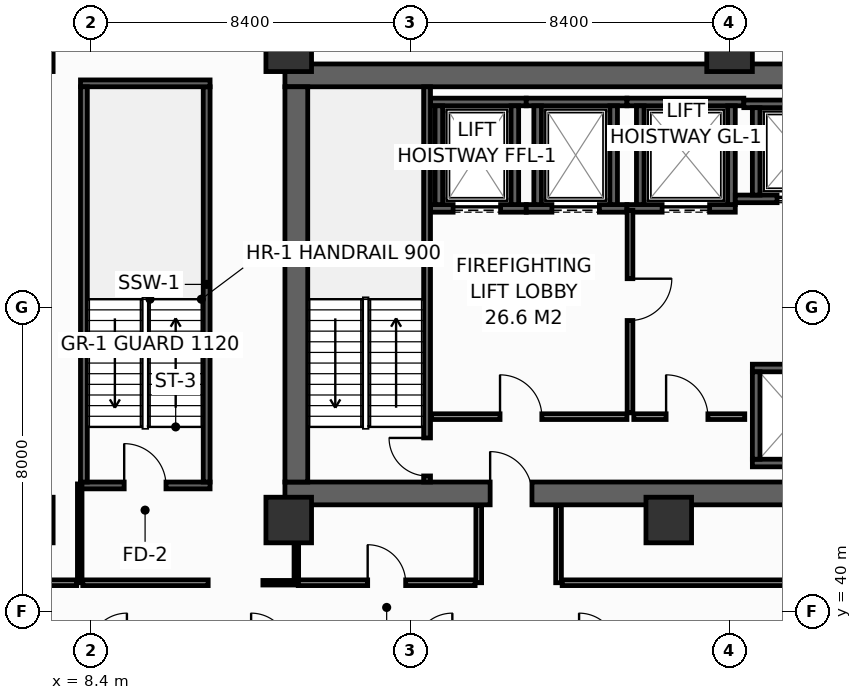
"""IFC4 building model, lengths in metres.
Left out: names, types, materials, properties, quantities, classifications, styles, units other than length and angle.
Written with IfcOpenShell. Run it as: python <this file> out.ifc"""

import sys

from ifc_helpers import new_model, si_unit, direction, frame, frame_2d, origin, origin_2d, place, context, subcontext, project, spatial, rectangle, hollow_rectangle, extrude, element, fill, save


model = new_model("IFC4")
c1 = context("Model", 3, precision=1e-05, world=origin(), true_north=direction((0.0, 1.0)))
c2 = subcontext(c1, "Body", "Model", "MODEL_VIEW")
j1 = project(units=[si_unit("LENGTHUNIT", "METRE"), si_unit("PLANEANGLEUNIT", "RADIAN")], contexts=[c1])
p1 = place(None, origin())
s1 = spatial("IfcSite", under=j1, at=p1, CompositionType="ELEMENT")
p2 = place(p1, origin())
s2 = spatial("IfcBuilding", under=s1, at=p2, CompositionType="ELEMENT")
p3 = place(p2, frame((0.0, 0.0, 82.4)))
s3 = spatial("IfcBuildingStorey", under=s2, at=p3, CompositionType="ELEMENT", Elevation=82.4)
p4 = place(p3, frame((13.5, 43.1, 0.0), z_axis=(0.0, 0.0, 1.0), x_axis=(1.0, 0.0, 0.0)))
e1 = element("IfcWall", 1, at=p4, inside=s3, PredefinedType="SHEAR", context=c2, shape_type="SweptSolid", body=[
    extrude(rectangle(XDim=32.9, YDim=0.6, at=frame_2d((16.45, 0.0))), origin(), (0.0, 0.0, 1.0), 3.95),
])
p5 = place(p4, frame((5.4, 0.0, 0.0)))
e2 = element("IfcOpeningElement", 2, at=p5, cuts=e1, PredefinedType="OPENING", context=c2, shape_type="SweptSolid", body=[
    extrude(rectangle(XDim=1.1, YDim=2.15, at=frame_2d((0.55, 1.075))), frame((0.0, 0.31, 0.0), z_axis=(0.0, -1.0, 0.0), x_axis=(1.0, 0.0, 0.0)), (0.0, 0.0, 1.0), 0.62),
])
p6 = place(p4, frame((25.6, 0.0, 0.0)))
e3 = element("IfcOpeningElement", 3, at=p6, cuts=e1, PredefinedType="OPENING", context=c2, shape_type="SweptSolid", body=[
    extrude(rectangle(XDim=1.1, YDim=2.15, at=frame_2d((0.55, 1.075))), frame((0.0, 0.31, 0.0), z_axis=(0.0, -1.0, 0.0), x_axis=(1.0, 0.0, 0.0)), (0.0, 0.0, 1.0), 0.62),
])
p7 = place(p3, frame((13.5, 54.1, 0.0), z_axis=(0.0, 0.0, 1.0), x_axis=(1.0, 0.0, 0.0)))
e4 = element("IfcWall", 4, at=p7, inside=s3, PredefinedType="SHEAR", context=c2, shape_type="SweptSolid", body=[
    extrude(rectangle(XDim=32.9, YDim=0.6, at=frame_2d((16.45, 0.0))), origin(), (0.0, 0.0, 1.0), 3.95),
])
p8 = place(p3, frame((13.8, 43.4, 0.0), z_axis=(0.0, 0.0, 1.0), x_axis=(0.0, 1.0, 0.0)))
e5 = element("IfcWall", 5, at=p8, inside=s3, PredefinedType="SHEAR", context=c2, shape_type="SweptSolid", body=[
    extrude(rectangle(XDim=10.4, YDim=0.6, at=frame_2d((5.2, 0.0))), origin(), (0.0, 0.0, 1.0), 3.95),
])
for number, where, z_axis, x_axis in (
    (6, (6.8, 54.8, 0.0), (0.0, 0.0, 1.0), (1.0, 0.0, 0.0)),
    (7, (13.6, 54.8, 0.0), (0.0, 0.0, 1.0), (1.0, 0.0, 0.0)),
    (8, (25.2, 54.8, 0.0), (0.0, 0.0, 1.0), (1.0, 0.0, 0.0)),
    (9, (6.8, 42.4, 0.0), (0.0, 0.0, 1.0), (1.0, 0.0, 0.0)),
    (10, (13.6, 42.4, 0.0), (0.0, 0.0, 1.0), (1.0, 0.0, 0.0)),
    (11, (23.6, 42.4, 0.0), (0.0, 0.0, 1.0), (1.0, 0.0, 0.0)),
):
    element("IfcColumn", number, at=place(p3, frame(where, z_axis=z_axis, x_axis=x_axis)), inside=s3, PredefinedType="COLUMN", context=c2, shape_type="SweptSolid", body=[
        extrude(hollow_rectangle(XDim=1.2, YDim=1.2, WallThickness=0.055, at=origin_2d()), origin(), (0.0, 0.0, 1.0), 4.4),
    ])
p9 = place(p3, frame((17.33, 50.6, 0.0), z_axis=(0.0, 0.0, 1.0), x_axis=(1.0, 0.0, 0.0)))
e12 = element("IfcWall", 12, at=p9, inside=s3, PredefinedType="SHEAR", context=c2, shape_type="SweptSolid", body=[
    extrude(rectangle(XDim=2.52, YDim=0.2, at=frame_2d((1.26, 0.0))), origin(), (0.0, 0.0, 1.0), 3.95),
])
p10 = place(p9, frame((0.595, 0.0, 0.0)))
e13 = element("IfcOpeningElement", 13, at=p10, cuts=e12, PredefinedType="OPENING", context=c2, shape_type="SweptSolid", body=[
    extrude(rectangle(XDim=1.25, YDim=2.3, at=frame_2d((0.625, 1.15))), frame((0.0, 0.11, 0.0), z_axis=(0.0, -1.0, 0.0), x_axis=(1.0, 0.0, 0.0)), (0.0, 0.0, 1.0), 0.22),
])
p11 = place(p3, frame((17.33, 53.4, 0.0), z_axis=(0.0, 0.0, 1.0), x_axis=(1.0, 0.0, 0.0)))
e14 = element("IfcWall", 14, at=p11, inside=s3, PredefinedType="SHEAR", context=c2, shape_type="SweptSolid", body=[
    extrude(rectangle(XDim=2.52, YDim=0.2, at=frame_2d((1.26, 0.0))), origin(), (0.0, 0.0, 1.0), 3.95),
])
for number, where, z_axis, x_axis in (
    (15, (17.55, 50.7, 0.0), (0.0, 0.0, 1.0), (0.0, 1.0, 0.0)),
    (16, (19.55, 50.7, 0.0), (0.0, 0.0, 1.0), (0.0, 1.0, 0.0)),
):
    element("IfcWall", number, at=place(p3, frame(where, z_axis=z_axis, x_axis=x_axis)), inside=s3, PredefinedType="SHEAR", context=c2, shape_type="SweptSolid", body=[
        extrude(rectangle(XDim=2.6, YDim=0.2, at=frame_2d((1.3, 0.0))), origin(), (0.0, 0.0, 1.0), 3.95),
    ])
p12 = place(p3, frame((19.85, 50.6, 0.0), z_axis=(0.0, 0.0, 1.0), x_axis=(1.0, 0.0, 0.0)))
e17 = element("IfcWall", 17, at=p12, inside=s3, PredefinedType="SHEAR", context=c2, shape_type="SweptSolid", body=[
    extrude(rectangle(XDim=2.65, YDim=0.2, at=frame_2d((1.325, 0.0))), origin(), (0.0, 0.0, 1.0), 3.95),
])
p13 = place(p12, frame((0.675, 0.0, 0.0)))
e18 = element("IfcOpeningElement", 18, at=p13, cuts=e17, PredefinedType="OPENING", context=c2, shape_type="SweptSolid", body=[
    extrude(rectangle(XDim=1.25, YDim=2.3, at=frame_2d((0.625, 1.15))), frame((0.0, 0.11, 0.0), z_axis=(0.0, -1.0, 0.0), x_axis=(1.0, 0.0, 0.0)), (0.0, 0.0, 1.0), 0.22),
])
p14 = place(p3, frame((19.85, 53.4, 0.0), z_axis=(0.0, 0.0, 1.0), x_axis=(1.0, 0.0, 0.0)))
e19 = element("IfcWall", 19, at=p14, inside=s3, PredefinedType="SHEAR", context=c2, shape_type="SweptSolid", body=[
    extrude(rectangle(XDim=2.65, YDim=0.2, at=frame_2d((1.325, 0.0))), origin(), (0.0, 0.0, 1.0), 3.95),
])
for number, where, z_axis, x_axis in (
    (20, (20.15, 50.7, 0.0), (0.0, 0.0, 1.0), (0.0, 1.0, 0.0)),
    (21, (22.15, 50.7, 0.0), (0.0, 0.0, 1.0), (0.0, 1.0, 0.0)),
):
    element("IfcWall", number, at=place(p3, frame(where, z_axis=z_axis, x_axis=x_axis)), inside=s3, PredefinedType="SHEAR", context=c2, shape_type="SweptSolid", body=[
        extrude(rectangle(XDim=2.6, YDim=0.2, at=frame_2d((1.3, 0.0))), origin(), (0.0, 0.0, 1.0), 3.95),
    ])
p15 = place(p3, frame((22.5, 50.6, 0.0), z_axis=(0.0, 0.0, 1.0), x_axis=(1.0, 0.0, 0.0)))
e22 = element("IfcWall", 22, at=p15, inside=s3, PredefinedType="SHEAR", context=c2, shape_type="SweptSolid", body=[
    extrude(rectangle(XDim=2.85, YDim=0.2, at=frame_2d((1.425, 0.0))), origin(), (0.0, 0.0, 1.0), 3.95),
])
p16 = place(p15, frame((0.925, 0.0, 0.0)))
e23 = element("IfcOpeningElement", 23, at=p16, cuts=e22, PredefinedType="OPENING", context=c2, shape_type="SweptSolid", body=[
    extrude(rectangle(XDim=1.25, YDim=2.3, at=frame_2d((0.625, 1.15))), frame((0.0, 0.11, 0.0), z_axis=(0.0, -1.0, 0.0), x_axis=(1.0, 0.0, 0.0)), (0.0, 0.0, 1.0), 0.22),
])
p17 = place(p3, frame((22.5, 53.4, 0.0), z_axis=(0.0, 0.0, 1.0), x_axis=(1.0, 0.0, 0.0)))
e24 = element("IfcWall", 24, at=p17, inside=s3, PredefinedType="SHEAR", context=c2, shape_type="SweptSolid", body=[
    extrude(rectangle(XDim=3.075, YDim=0.2, at=frame_2d((1.538, 0.0))), origin(), (0.0, 0.0, 1.0), 3.95),
])
for number, where, z_axis, x_axis in (
    (25, (22.85, 50.7, 0.0), (0.0, 0.0, 1.0), (0.0, 1.0, 0.0)),
    (26, (25.25, 50.7, 0.0), (0.0, 0.0, 1.0), (0.0, 1.0, 0.0)),
):
    element("IfcWall", number, at=place(p3, frame(where, z_axis=z_axis, x_axis=x_axis)), inside=s3, PredefinedType="SHEAR", context=c2, shape_type="SweptSolid", body=[
        extrude(rectangle(XDim=2.6, YDim=0.2, at=frame_2d((1.3, 0.0))), origin(), (0.0, 0.0, 1.0), 3.95),
    ])
p18 = place(p3, frame((25.35, 50.85, 0.0), z_axis=(0.0, 0.0, 1.0), x_axis=(1.0, 0.0, 0.0)))
e27 = element("IfcWall", 27, at=p18, inside=s3, PredefinedType="SHEAR", context=c2, shape_type="SweptSolid", body=[
    extrude(rectangle(XDim=3.025, YDim=0.2, at=frame_2d((1.512, 0.0))), origin(), (0.0, 0.0, 1.0), 3.95),
])
p19 = place(p18, frame((1.1, 0.0, 0.0)))
e28 = element("IfcOpeningElement", 28, at=p19, cuts=e27, PredefinedType="OPENING", context=c2, shape_type="SweptSolid", body=[
    extrude(rectangle(XDim=1.1, YDim=2.2, at=frame_2d((0.55, 1.1))), frame((0.0, 0.11, 0.0), z_axis=(0.0, -1.0, 0.0), x_axis=(1.0, 0.0, 0.0)), (0.0, 0.0, 1.0), 0.22),
])
p20 = place(p3, frame((25.575, 53.35, 0.0), z_axis=(0.0, 0.0, 1.0), x_axis=(1.0, 0.0, 0.0)))
e29 = element("IfcWall", 29, at=p20, inside=s3, PredefinedType="SHEAR", context=c2, shape_type="SweptSolid", body=[
    extrude(rectangle(XDim=2.8, YDim=0.2, at=frame_2d((1.4, 0.0))), origin(), (0.0, 0.0, 1.0), 3.95),
])
p21 = place(p3, frame((25.9, 50.95, 0.0), z_axis=(0.0, 0.0, 1.0), x_axis=(0.0, 1.0, 0.0)))
e30 = element("IfcWall", 30, at=p21, inside=s3, PredefinedType="SHEAR", context=c2, shape_type="SweptSolid", body=[
    extrude(rectangle(XDim=2.3, YDim=0.2, at=frame_2d((1.15, 0.0))), origin(), (0.0, 0.0, 1.0), 3.95),
])
for number, where, z_axis, x_axis in (
    (31, (25.8, 43.9, 0.0), (0.0, 0.0, 1.0), (1.0, 0.0, 0.0)),
    (32, (25.8, 46.4, 0.0), (0.0, 0.0, 1.0), (1.0, 0.0, 0.0)),
):
    element("IfcWall", number, at=place(p3, frame(where, z_axis=z_axis, x_axis=x_axis)), inside=s3, PredefinedType="SHEAR", context=c2, shape_type="SweptSolid", body=[
        extrude(rectangle(XDim=2.575, YDim=0.2, at=frame_2d((1.288, 0.0))), origin(), (0.0, 0.0, 1.0), 3.95),
    ])
p22 = place(p3, frame((25.9, 44.0, 0.0), z_axis=(0.0, 0.0, 1.0), x_axis=(0.0, 1.0, 0.0)))
e33 = element("IfcWall", 33, at=p22, inside=s3, PredefinedType="SHEAR", context=c2, shape_type="SweptSolid", body=[
    extrude(rectangle(XDim=2.3, YDim=0.2, at=frame_2d((1.15, 0.0))), origin(), (0.0, 0.0, 1.0), 3.95),
])
p23 = place(p3, frame((17.24, 43.4, 0.0), z_axis=(0.0, 0.0, 1.0), x_axis=(0.0, 1.0, 0.0)))
e34 = element("IfcWall", 34, at=p23, inside=s3, PredefinedType="SHEAR", context=c2, shape_type="SweptSolid", body=[
    extrude(rectangle(XDim=10.4, YDim=0.18, at=frame_2d((5.2, 0.0))), origin(), (0.0, 0.0, 1.0), 3.95),
])
p24 = place(p23, frame((0.16, 0.0, 0.0)))
e35 = element("IfcOpeningElement", 35, at=p24, cuts=e34, PredefinedType="OPENING", context=c2, shape_type="SweptSolid", body=[
    extrude(rectangle(XDim=1.0, YDim=2.15, at=frame_2d((0.5, 1.075))), frame((0.0, 0.1, 0.0), z_axis=(0.0, -1.0, 0.0), x_axis=(1.0, 0.0, 0.0)), (0.0, 0.0, 1.0), 0.2),
])
p25 = place(p3, frame((8.12, 43.31, 0.0), z_axis=(0.0, 0.0, 1.0), x_axis=(1.0, 0.0, 0.0)))
e36 = element("IfcWall", 36, at=p25, inside=s3, PredefinedType="SHEAR", context=c2, shape_type="SweptSolid", body=[
    extrude(rectangle(XDim=3.41, YDim=0.18, at=frame_2d((1.705, 0.0))), origin(), (0.0, 0.0, 1.0), 3.95),
])
p26 = place(p25, frame((1.15, 0.0, 0.0)))
e37 = element("IfcOpeningElement", 37, at=p26, cuts=e36, PredefinedType="OPENING", context=c2, shape_type="SweptSolid", body=[
    extrude(rectangle(XDim=1.1, YDim=2.15, at=frame_2d((0.55, 1.075))), frame((0.0, 0.1, 0.0), z_axis=(0.0, -1.0, 0.0), x_axis=(1.0, 0.0, 0.0)), (0.0, 0.0, 1.0), 0.2),
])
p27 = place(p3, frame((11.44, 43.4, 0.0), z_axis=(0.0, 0.0, 1.0), x_axis=(0.0, 1.0, 0.0)))
e38 = element("IfcWall", 38, at=p27, inside=s3, PredefinedType="SHEAR", context=c2, shape_type="SweptSolid", body=[
    extrude(rectangle(XDim=10.4, YDim=0.18, at=frame_2d((5.2, 0.0))), origin(), (0.0, 0.0, 1.0), 3.95),
])
p28 = place(p3, frame((11.53, 53.89, 0.0), z_axis=(0.0, 0.0, 1.0), x_axis=(-1.0, 0.0, 0.0)))
e39 = element("IfcWall", 39, at=p28, inside=s3, PredefinedType="SHEAR", context=c2, shape_type="SweptSolid", body=[
    extrude(rectangle(XDim=3.41, YDim=0.18, at=frame_2d((1.705, 0.0))), origin(), (0.0, 0.0, 1.0), 3.95),
])
p29 = place(p3, frame((8.21, 53.8, 0.0), z_axis=(0.0, 0.0, 1.0), x_axis=(0.0, -1.0, 0.0)))
e40 = element("IfcWall", 40, at=p29, inside=s3, PredefinedType="SHEAR", context=c2, shape_type="SweptSolid", body=[
    extrude(rectangle(XDim=10.4, YDim=0.18, at=frame_2d((5.2, 0.0))), origin(), (0.0, 0.0, 1.0), 3.95),
])
p30 = place(p3, frame((17.36, 45.12, 0.0), z_axis=(0.0, 0.0, 1.0), x_axis=(1.0, 0.0, 0.0)))
e41 = element("IfcWall", 41, at=p30, inside=s3, PredefinedType="PARTITIONING", context=c2, shape_type="SweptSolid", body=[
    extrude(rectangle(XDim=5.14, YDim=0.15, at=frame_2d((2.57, 0.0))), origin(), (0.0, 0.0, 1.0), 3.95),
])
p31 = place(p30, frame((1.8, 0.0, 0.0)))
e42 = element("IfcOpeningElement", 42, at=p31, cuts=e41, PredefinedType="OPENING", context=c2, shape_type="SweptSolid", body=[
    extrude(rectangle(XDim=1.1, YDim=2.15, at=frame_2d((0.55, 1.075))), frame((0.0, 0.085, 0.0), z_axis=(0.0, -1.0, 0.0), x_axis=(1.0, 0.0, 0.0)), (0.0, 0.0, 1.0), 0.17),
])
p32 = place(p3, frame((22.58, 50.55, 0.0), z_axis=(0.0, 0.0, 1.0), x_axis=(0.0, -1.0, 0.0)))
e43 = element("IfcWall", 43, at=p32, inside=s3, PredefinedType="PARTITIONING", context=c2, shape_type="SweptSolid", body=[
    extrude(rectangle(XDim=5.33, YDim=0.15, at=frame_2d((2.665, 0.0))), origin(), (0.0, 0.0, 1.0), 3.95),
])
p33 = place(p32, frame((1.8, 0.0, 0.0)))
e44 = element("IfcOpeningElement", 44, at=p33, cuts=e43, PredefinedType="OPENING", context=c2, shape_type="SweptSolid", body=[
    extrude(rectangle(XDim=1.1, YDim=2.15, at=frame_2d((0.55, 1.075))), frame((0.0, 0.085, 0.0), z_axis=(0.0, -1.0, 0.0), x_axis=(1.0, 0.0, 0.0)), (0.0, 0.0, 1.0), 0.17),
])
p34 = place(p3, frame((22.68, 45.12, 0.0), z_axis=(0.0, 0.0, 1.0), x_axis=(1.0, 0.0, 0.0)))
e45 = element("IfcWall", 45, at=p34, inside=s3, PredefinedType="PARTITIONING", context=c2, shape_type="SweptSolid", body=[
    extrude(rectangle(XDim=2.92, YDim=0.15, at=frame_2d((1.46, 0.0))), origin(), (0.0, 0.0, 1.0), 3.95),
])
p35 = place(p34, frame((0.85, 0.0, 0.0)))
e46 = element("IfcOpeningElement", 46, at=p35, cuts=e45, PredefinedType="OPENING", context=c2, shape_type="SweptSolid", body=[
    extrude(rectangle(XDim=1.1, YDim=2.15, at=frame_2d((0.55, 1.075))), frame((0.0, 0.085, 0.0), z_axis=(0.0, -1.0, 0.0), x_axis=(1.0, 0.0, 0.0)), (0.0, 0.0, 1.0), 0.17),
])
p36 = place(p3, frame((12.92, 40.75, 0.0), z_axis=(0.0, 0.0, 1.0), x_axis=(1.0, 0.0, 0.0)))
e47 = element("IfcWall", 47, at=p36, inside=s3, PredefinedType="PARTITIONING", context=c2, shape_type="SweptSolid", body=[
    extrude(rectangle(XDim=0.93, YDim=0.12, at=frame_2d((0.465, 0.0))), origin(), (0.0, 0.0, 1.0), 3.95),
])
p37 = place(p3, frame((13.8, 40.83, 0.0), z_axis=(0.0, 0.0, 1.0), x_axis=(0.0, 1.0, 0.0)))
e48 = element("IfcWall", 48, at=p37, inside=s3, PredefinedType="PARTITIONING", context=c2, shape_type="SweptSolid", body=[
    extrude(rectangle(XDim=1.95, YDim=0.12, at=frame_2d((0.975, 0.0))), origin(), (0.0, 0.0, 1.0), 3.95),
])
p38 = place(p3, frame((8.1, 40.75, 0.0), z_axis=(0.0, 0.0, 1.0), x_axis=(0.0, 1.0, 0.0)))
e49 = element("IfcWall", 49, at=p38, inside=s3, PredefinedType="PARTITIONING", context=c2, shape_type="SweptSolid", body=[
    extrude(rectangle(XDim=2.6, YDim=0.12, at=frame_2d((1.3, 0.0))), origin(), (0.0, 0.0, 1.0), 3.135),
])
p39 = place(p3, frame((8.18, 40.75, 0.0), z_axis=(0.0, 0.0, 1.0), x_axis=(1.0, 0.0, 0.0)))
e50 = element("IfcWall", 50, at=p39, inside=s3, PredefinedType="PARTITIONING", context=c2, shape_type="SweptSolid", body=[
    extrude(rectangle(XDim=3.3, YDim=0.15, at=frame_2d((1.65, 0.0))), origin(), (0.0, 0.0, 1.0), 3.95),
])
p40 = place(p3, frame((5.979, 40.75, 0.0), z_axis=(0.0, 0.0, 1.0), x_axis=(1.0, 0.0, 0.0)))
e51 = element("IfcWall", 51, at=p40, inside=s3, PredefinedType="PARTITIONING", context=c2, shape_type="SweptSolid", body=[
    extrude(rectangle(XDim=2.041, YDim=0.15, at=frame_2d((1.02, 0.0))), origin(), (0.0, 0.0, 1.0), 3.435),
])
for number, where, z_axis, x_axis in (
    (52, (18.6, 40.75, 0.0), (0.0, 0.0, 1.0), (0.0, 1.0, 0.0)),
    (53, (20.7, 40.75, 0.0), (0.0, 0.0, 1.0), (0.0, 1.0, 0.0)),
):
    element("IfcWall", number, at=place(p3, frame(where, z_axis=z_axis, x_axis=x_axis)), inside=s3, PredefinedType="PARTITIONING", context=c2, shape_type="SweptSolid", body=[
        extrude(rectangle(XDim=2.03, YDim=0.15, at=frame_2d((1.015, 0.0))), origin(), (0.0, 0.0, 1.0), 3.95),
    ])
p41 = place(p3, frame((13.85, 40.75, 0.0), z_axis=(0.0, 0.0, 1.0), x_axis=(1.0, 0.0, 0.0)))
e54 = element("IfcWall", 54, at=p41, inside=s3, PredefinedType="PARTITIONING", context=c2, shape_type="SweptSolid", body=[
    extrude(rectangle(XDim=4.655, YDim=0.15, at=frame_2d((2.327, 0.0))), origin(), (0.0, 0.0, 1.0), 3.95),
])
p42 = place(p41, frame((1.827, 0.0, 0.0)))
e55 = element("IfcOpeningElement", 55, at=p42, cuts=e54, PredefinedType="OPENING", context=c2, shape_type="SweptSolid", body=[
    extrude(rectangle(XDim=1.0, YDim=2.15, at=frame_2d((0.5, 1.075))), frame((0.0, 0.085, 0.0), z_axis=(0.0, -1.0, 0.0), x_axis=(1.0, 0.0, 0.0)), (0.0, 0.0, 1.0), 0.17),
])
p43 = place(p3, frame((20.795, 40.75, 0.0), z_axis=(0.0, 0.0, 1.0), x_axis=(1.0, 0.0, 0.0)))
e56 = element("IfcWall", 56, at=p43, inside=s3, PredefinedType="PARTITIONING", context=c2, shape_type="SweptSolid", body=[
    extrude(rectangle(XDim=17.91, YDim=0.15, at=frame_2d((8.955, 0.0))), origin(), (0.0, 0.0, 1.0), 3.135),
])
p44 = place(p43, frame((8.455, 0.0, 0.0)))
e57 = element("IfcOpeningElement", 57, at=p44, cuts=e56, PredefinedType="OPENING", context=c2, shape_type="SweptSolid", body=[
    extrude(rectangle(XDim=1.0, YDim=2.15, at=frame_2d((0.5, 1.075))), frame((0.0, 0.085, 0.0), z_axis=(0.0, -1.0, 0.0), x_axis=(1.0, 0.0, 0.0)), (0.0, 0.0, 1.0), 0.17),
])
p45 = place(p10, origin())
e58 = element("IfcDoor", 58, at=p45, inside=s3, OperationType="SLIDING_TO_LEFT", PredefinedType="DOOR", context=c2, shape_type="SweptSolid", body=[
    extrude(rectangle(XDim=1.25, YDim=2.3, at=frame_2d((0.625, 1.15))), frame((0.0, 0.025, 0.0), z_axis=(0.0, -1.0, 0.0), x_axis=(1.0, 0.0, 0.0)), (0.0, 0.0, 1.0), 0.05),
])
fill(e13, e58)
p46 = place(p13, origin())
e59 = element("IfcDoor", 59, at=p46, inside=s3, OperationType="SLIDING_TO_LEFT", PredefinedType="DOOR", context=c2, shape_type="SweptSolid", body=[
    extrude(rectangle(XDim=1.25, YDim=2.3, at=frame_2d((0.625, 1.15))), frame((0.0, 0.025, 0.0), z_axis=(0.0, -1.0, 0.0), x_axis=(1.0, 0.0, 0.0)), (0.0, 0.0, 1.0), 0.05),
])
fill(e18, e59)
p47 = place(p16, origin())
e60 = element("IfcDoor", 60, at=p47, inside=s3, OperationType="SLIDING_TO_LEFT", PredefinedType="DOOR", context=c2, shape_type="SweptSolid", body=[
    extrude(rectangle(XDim=1.25, YDim=2.3, at=frame_2d((0.625, 1.15))), frame((0.0, 0.025, 0.0), z_axis=(0.0, -1.0, 0.0), x_axis=(1.0, 0.0, 0.0)), (0.0, 0.0, 1.0), 0.05),
])
fill(e23, e60)
p48 = place(p19, origin())
e61 = element("IfcDoor", 61, at=p48, inside=s3, OperationType="SLIDING_TO_LEFT", PredefinedType="DOOR", context=c2, shape_type="SweptSolid", body=[
    extrude(rectangle(XDim=1.1, YDim=2.2, at=frame_2d((0.55, 1.1))), frame((0.0, 0.025, 0.0), z_axis=(0.0, -1.0, 0.0), x_axis=(1.0, 0.0, 0.0)), (0.0, 0.0, 1.0), 0.05),
])
fill(e28, e61)
p49 = place(p24, origin())
e62 = element("IfcDoor", 62, at=p49, inside=s3, OperationType="SINGLE_SWING_RIGHT", PredefinedType="DOOR", context=c2, shape_type="SweptSolid", body=[
    extrude(rectangle(XDim=1.0, YDim=2.15, at=frame_2d((0.5, 1.075))), frame((0.0, 0.025, 0.0), z_axis=(0.0, -1.0, 0.0), x_axis=(1.0, 0.0, 0.0)), (0.0, 0.0, 1.0), 0.05),
])
fill(e35, e62)
p50 = place(p26, origin())
e63 = element("IfcDoor", 63, at=p50, inside=s3, OperationType="SINGLE_SWING_LEFT", PredefinedType="DOOR", context=c2, shape_type="SweptSolid", body=[
    extrude(rectangle(XDim=1.1, YDim=2.15, at=frame_2d((0.55, 1.075))), frame((0.0, 0.025, 0.0), z_axis=(0.0, -1.0, 0.0), x_axis=(1.0, 0.0, 0.0)), (0.0, 0.0, 1.0), 0.05),
])
fill(e37, e63)
p51 = place(p31, origin())
e64 = element("IfcDoor", 64, at=p51, inside=s3, OperationType="SINGLE_SWING_LEFT", PredefinedType="DOOR", context=c2, shape_type="SweptSolid", body=[
    extrude(rectangle(XDim=1.1, YDim=2.15, at=frame_2d((0.55, 1.075))), frame((0.0, 0.025, 0.0), z_axis=(0.0, -1.0, 0.0), x_axis=(1.0, 0.0, 0.0)), (0.0, 0.0, 1.0), 0.05),
])
fill(e42, e64)
p52 = place(p33, origin())
e65 = element("IfcDoor", 65, at=p52, inside=s3, OperationType="SINGLE_SWING_LEFT", PredefinedType="DOOR", context=c2, shape_type="SweptSolid", body=[
    extrude(rectangle(XDim=1.1, YDim=2.15, at=frame_2d((0.55, 1.075))), frame((0.0, 0.025, 0.0), z_axis=(0.0, -1.0, 0.0), x_axis=(1.0, 0.0, 0.0)), (0.0, 0.0, 1.0), 0.05),
])
fill(e44, e65)
p53 = place(p35, origin())
e66 = element("IfcDoor", 66, at=p53, inside=s3, OperationType="SINGLE_SWING_LEFT", PredefinedType="DOOR", context=c2, shape_type="SweptSolid", body=[
    extrude(rectangle(XDim=1.1, YDim=2.15, at=frame_2d((0.55, 1.075))), frame((0.0, 0.025, 0.0), z_axis=(0.0, -1.0, 0.0), x_axis=(1.0, 0.0, 0.0)), (0.0, 0.0, 1.0), 0.05),
])
fill(e46, e66)
p54 = place(p5, origin())
e67 = element("IfcDoor", 67, at=p54, inside=s3, OperationType="SINGLE_SWING_LEFT", PredefinedType="DOOR", context=c2, shape_type="SweptSolid", body=[
    extrude(rectangle(XDim=1.1, YDim=2.15, at=frame_2d((0.55, 1.075))), frame((0.0, 0.025, 0.0), z_axis=(0.0, -1.0, 0.0), x_axis=(1.0, 0.0, 0.0)), (0.0, 0.0, 1.0), 0.05),
])
fill(e2, e67)
p55 = place(p42, origin())
e68 = element("IfcDoor", 68, at=p55, inside=s3, OperationType="SINGLE_SWING_LEFT", PredefinedType="DOOR", context=c2, shape_type="SweptSolid", body=[
    extrude(rectangle(XDim=1.0, YDim=2.15, at=frame_2d((0.5, 1.075))), frame((0.0, 0.025, 0.0), z_axis=(0.0, -1.0, 0.0), x_axis=(1.0, 0.0, 0.0)), (0.0, 0.0, 1.0), 0.05),
])
fill(e55, e68)
save(model, sys.argv[1])
